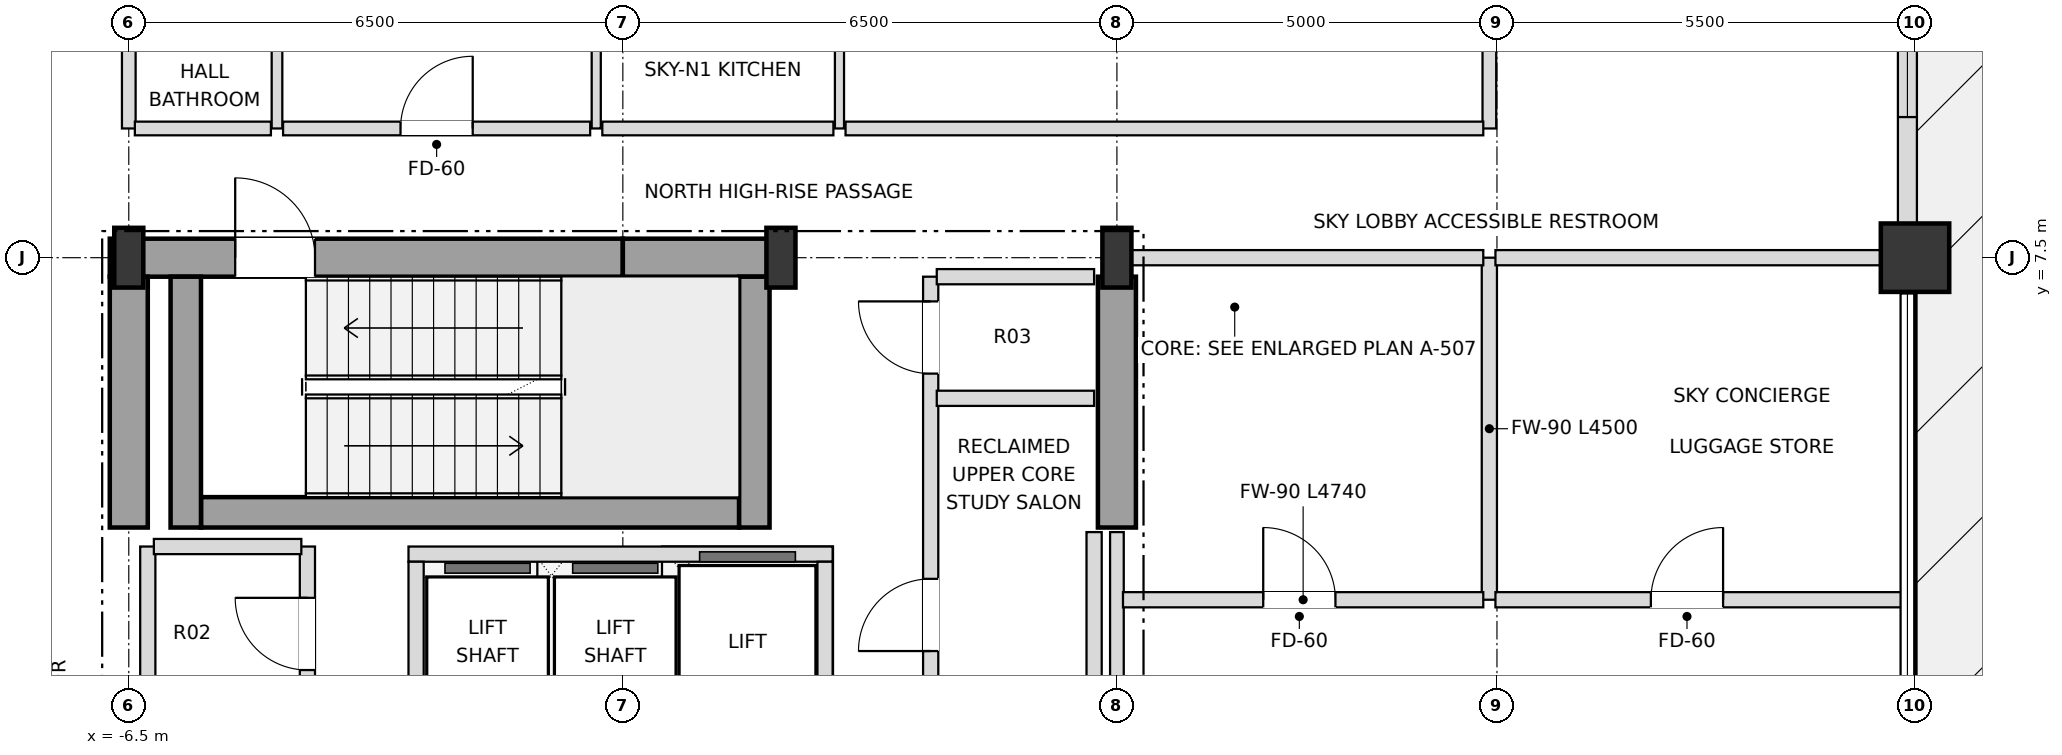
"""IFC4 building model, lengths in metres.
Left out: names, types, materials, properties, quantities, classifications, styles, units other than length and angle.
Written with IfcOpenShell. Run it as: python <this file> out.ifc"""

import sys

from ifc_helpers import new_model, si_unit, direction, frame, frame_2d, origin, origin_2d, place, context, subcontext, project, spatial, rectangle, i_section, extrude, element, fill, save


model = new_model("IFC4")
c1 = context("Model", 3, precision=1e-05, world=origin(), true_north=direction((0.0, 1.0)))
c2 = subcontext(c1, "Body", "Model", "MODEL_VIEW")
j1 = project(units=[si_unit("LENGTHUNIT", "METRE"), si_unit("PLANEANGLEUNIT", "RADIAN")], contexts=[c1])
p1 = place(None, origin())
s1 = spatial("IfcSite", under=j1, at=p1, CompositionType="ELEMENT")
p2 = place(p1, origin())
s2 = spatial("IfcBuilding", under=s1, at=p2, CompositionType="ELEMENT")
p3 = place(p2, frame((0.0, 0.0, 217.8)))
s3 = spatial("IfcBuildingStorey", under=s2, at=p3, CompositionType="ELEMENT", Elevation=217.8)
for number, where, z_axis, x_axis in (
    (1, (-6.5, 7.5, 0.0), (0.0, 0.0, 1.0), (1.0, 0.0, 0.0)),
    (2, (2.08, 7.5, 0.0), (0.0, 0.0, 1.0), (1.0, 0.0, 0.0)),
    (3, (6.5, 7.5, 0.0), (0.0, 0.0, 1.0), (1.0, 0.0, 0.0)),
):
    element("IfcColumn", number, at=place(p3, frame(where, z_axis=z_axis, x_axis=x_axis)), inside=s3, PredefinedType="COLUMN", context=c2, shape_type="SweptSolid", body=[
        extrude(i_section(OverallWidth=0.382, OverallDepth=0.786, WebThickness=0.02, FlangeThickness=0.033, at=origin_2d()), origin(), (0.0, 0.0, 1.0), 4.5),
    ])
p4 = place(p3, frame((17.0, 7.5, 0.0), z_axis=(0.0, 0.0, 1.0), x_axis=(1.0, 0.0, 0.0)))
e4 = element("IfcColumn", 4, at=p4, inside=s3, PredefinedType="USERDEFINED", context=c2, shape_type="SweptSolid", body=[
    extrude(rectangle(XDim=0.9, YDim=0.9, at=origin_2d()), origin(), (0.0, 0.0, 1.0), 4.5),
])
p5 = place(p3, frame((16.9, 7.945, 0.0), z_axis=(0.0, 0.0, 1.0), x_axis=(0.0, 1.0, 0.0)))
e5 = element("IfcWall", 5, at=p5, inside=s3, PredefinedType="SOLIDWALL", context=c2, shape_type="SweptSolid", body=[
    extrude(rectangle(XDim=4.61, YDim=0.25, at=frame_2d((2.305, 0.0))), origin(), (0.0, 0.0, 1.0), 3.648),
])
p6 = place(p5, frame((1.405, 0.0, 0.72)))
e6 = element("IfcOpeningElement", 6, at=p6, cuts=e5, PredefinedType="OPENING", context=c2, shape_type="SweptSolid", body=[
    extrude(rectangle(XDim=1.8, YDim=1.68, at=frame_2d((0.9, 0.84))), frame((0.0, 0.135, 0.0), z_axis=(0.0, -1.0, 0.0), x_axis=(1.0, 0.0, 0.0)), (0.0, 0.0, 1.0), 0.27),
])
p7 = place(p3, frame((-6.75, 7.5, 0.0), z_axis=(0.0, 0.0, 1.0), x_axis=(1.0, 0.0, 0.0)))
e7 = element("IfcWall", 7, at=p7, inside=s3, PredefinedType="SHEAR", context=c2, shape_type="SweptSolid", body=[
    extrude(rectangle(XDim=6.75, YDim=0.5, at=frame_2d((3.375, 0.0))), origin(), (0.0, 0.0, 1.0), 4.28),
])
p8 = place(p7, frame((1.65, 0.0, 0.0)))
e8 = element("IfcOpeningElement", 8, at=p8, cuts=e7, PredefinedType="OPENING", context=c2, shape_type="SweptSolid", body=[
    extrude(rectangle(XDim=1.05, YDim=2.15, at=frame_2d((0.525, 1.075))), frame((0.0, 0.26, 0.0), z_axis=(0.0, -1.0, 0.0), x_axis=(1.0, 0.0, 0.0)), (0.0, 0.0, 1.0), 0.52),
])
p9 = place(p3, frame((0.0, 7.5, 0.0), z_axis=(0.0, 0.0, 1.0), x_axis=(1.0, 0.0, 0.0)))
e9 = element("IfcWall", 9, at=p9, inside=s3, PredefinedType="SHEAR", context=c2, shape_type="SweptSolid", body=[
    extrude(rectangle(XDim=2.08, YDim=0.5, at=frame_2d((1.04, 0.0))), origin(), (0.0, 0.0, 1.0), 4.28),
])
for number, where, z_axis, x_axis in (
    (10, (-6.5, 3.95, 0.0), (0.0, 0.0, 1.0), (0.0, 1.0, 0.0)),
    (11, (6.5, 3.95, 0.0), (0.0, 0.0, 1.0), (0.0, 1.0, 0.0)),
):
    element("IfcWall", number, at=place(p3, frame(where, z_axis=z_axis, x_axis=x_axis)), inside=s3, PredefinedType="SHEAR", context=c2, shape_type="SweptSolid", body=[
        extrude(rectangle(XDim=3.3, YDim=0.5, at=frame_2d((1.65, 0.0))), origin(), (0.0, 0.0, 1.0), 4.28),
    ])
p10 = place(p3, frame((-5.55, 4.15, 0.0), z_axis=(0.0, 0.0, 1.0), x_axis=(1.0, 0.0, 0.0)))
e12 = element("IfcWall", 12, at=p10, inside=s3, PredefinedType="SHEAR", context=c2, shape_type="SweptSolid", body=[
    extrude(rectangle(XDim=7.08, YDim=0.4, at=frame_2d((3.54, 0.0))), origin(), (0.0, 0.0, 1.0), 4.28),
])
for number, where, z_axis, x_axis in (
    (13, (1.73, 3.95, 0.0), (0.0, 0.0, 1.0), (0.0, 1.0, 0.0)),
    (14, (-5.75, 3.95, 0.0), (0.0, 0.0, 1.0), (0.0, 1.0, 0.0)),
):
    element("IfcWall", number, at=place(p3, frame(where, z_axis=z_axis, x_axis=x_axis)), inside=s3, PredefinedType="SHEAR", context=c2, shape_type="SweptSolid", body=[
        extrude(rectangle(XDim=3.3, YDim=0.4, at=frame_2d((1.65, 0.0))), origin(), (0.0, 0.0, 1.0), 4.28),
    ])
p11 = place(p3, frame((-2.82, 3.6, 0.0), z_axis=(0.0, 0.0, 1.0), x_axis=(1.0, 0.0, 0.0)))
e15 = element("IfcWall", 15, at=p11, inside=s3, PredefinedType="SOLIDWALL", context=c2, shape_type="SweptSolid", body=[
    extrude(rectangle(XDim=5.58, YDim=0.2, at=frame_2d((2.79, 0.0))), origin(), (0.0, 0.0, 1.0), 4.28),
])
for number, where, z_axis, x_axis in (
    (16, (-2.72, 1.0, 0.0), (0.0, 0.0, 1.0), (0.0, 1.0, 0.0)),
    (17, (2.66, 1.0, 0.0), (0.0, 0.0, 1.0), (0.0, 1.0, 0.0)),
):
    element("IfcWall", number, at=place(p3, frame(where, z_axis=z_axis, x_axis=x_axis)), inside=s3, PredefinedType="SOLIDWALL", context=c2, shape_type="SweptSolid", body=[
        extrude(rectangle(XDim=2.5, YDim=0.2, at=frame_2d((1.25, 0.0))), origin(), (0.0, 0.0, 1.0), 4.28),
    ])
p12 = place(p3, frame((-6.5, 9.2, 0.0), z_axis=(0.0, 0.0, 1.0), x_axis=(0.0, 1.0, 0.0)))
e18 = element("IfcWall", 18, at=p12, inside=s3, PredefinedType="PARTITIONING", context=c2, shape_type="SweptSolid", body=[
    extrude(rectangle(XDim=10.7, YDim=0.18, at=frame_2d((5.35, 0.0))), origin(), (0.0, 0.0, 1.0), 3.726),
])
p13 = place(p3, frame((-6.25, -3.64, 0.0), z_axis=(0.0, 0.0, 1.0), x_axis=(0.0, 1.0, 0.0)))
e19 = element("IfcWall", 19, at=p13, inside=s3, PredefinedType="SOLIDWALL", context=c2, shape_type="SweptSolid", body=[
    extrude(rectangle(XDim=7.34, YDim=0.2, at=frame_2d((3.67, 0.0))), origin(), (0.0, 0.0, 1.0), 4.28),
])
p14 = place(p3, frame((-4.55, 9.2, 0.0), z_axis=(0.0, 0.0, 1.0), x_axis=(0.0, 1.0, 0.0)))
e20 = element("IfcWall", 20, at=p14, inside=s3, PredefinedType="PARTITIONING", context=c2, shape_type="SweptSolid", body=[
    extrude(rectangle(XDim=4.7, YDim=0.14, at=frame_2d((2.35, 0.0))), origin(), (0.0, 0.0, 1.0), 4.28),
])
p15 = place(p14, frame((1.9, 0.0, 0.0)))
e21 = element("IfcOpeningElement", 21, at=p15, cuts=e20, PredefinedType="OPENING", context=c2, shape_type="SweptSolid", body=[
    extrude(rectangle(XDim=0.9, YDim=2.1, at=frame_2d((0.45, 1.05))), frame((0.0, 0.08, 0.0), z_axis=(0.0, -1.0, 0.0), x_axis=(1.0, 0.0, 0.0)), (0.0, 0.0, 1.0), 0.16),
])
p16 = place(p3, frame((-4.15, -3.7, 0.0), z_axis=(0.0, 0.0, 1.0), x_axis=(0.0, 1.0, 0.0)))
e22 = element("IfcWall", 22, at=p16, inside=s3, PredefinedType="SOLIDWALL", context=c2, shape_type="SweptSolid", body=[
    extrude(rectangle(XDim=7.4, YDim=0.2, at=frame_2d((3.7, 0.0))), origin(), (0.0, 0.0, 1.0), 4.28),
])
p17 = place(p16, frame((2.025, 0.0, 0.0)))
e23 = element("IfcOpeningElement", 23, at=p17, cuts=e22, PredefinedType="OPENING", context=c2, shape_type="SweptSolid", body=[
    extrude(rectangle(XDim=0.95, YDim=2.15, at=frame_2d((0.475, 1.075))), frame((0.0, 0.11, 0.0), z_axis=(0.0, -1.0, 0.0), x_axis=(1.0, 0.0, 0.0)), (0.0, 0.0, 1.0), 0.22),
])
p18 = place(p16, frame((5.775, 0.0, 0.0)))
e24 = element("IfcOpeningElement", 24, at=p18, cuts=e22, PredefinedType="OPENING", context=c2, shape_type="SweptSolid", body=[
    extrude(rectangle(XDim=0.95, YDim=2.15, at=frame_2d((0.475, 1.075))), frame((0.0, 0.11, 0.0), z_axis=(0.0, -1.0, 0.0), x_axis=(1.0, 0.0, 0.0)), (0.0, 0.0, 1.0), 0.22),
])
p19 = place(p3, frame((-0.35, 9.2, 0.0), z_axis=(0.0, 0.0, 1.0), x_axis=(0.0, 1.0, 0.0)))
e25 = element("IfcWall", 25, at=p19, inside=s3, PredefinedType="PARTITIONING", context=c2, shape_type="SweptSolid", body=[
    extrude(rectangle(XDim=10.7, YDim=0.12, at=frame_2d((5.35, 0.0))), origin(), (0.0, 0.0, 1.0), 3.918),
])
p20 = place(p19, frame((1.875, 0.0, 0.0)))
e26 = element("IfcOpeningElement", 26, at=p20, cuts=e25, PredefinedType="OPENING", context=c2, shape_type="SweptSolid", body=[
    extrude(rectangle(XDim=0.95, YDim=2.1, at=frame_2d((0.475, 1.05))), frame((0.0, 0.07, 0.0), z_axis=(0.0, -1.0, 0.0), x_axis=(1.0, 0.0, 0.0)), (0.0, 0.0, 1.0), 0.14),
])
p21 = place(p19, frame((7.25, 0.0, 0.0)))
e27 = element("IfcOpeningElement", 27, at=p21, cuts=e25, PredefinedType="OPENING", context=c2, shape_type="SweptSolid", body=[
    extrude(rectangle(XDim=0.9, YDim=2.1, at=frame_2d((0.45, 1.05))), frame((0.0, 0.07, 0.0), z_axis=(0.0, -1.0, 0.0), x_axis=(1.0, 0.0, 0.0)), (0.0, 0.0, 1.0), 0.14),
])
p22 = place(p3, frame((2.85, 9.2, 0.0), z_axis=(0.0, 0.0, 1.0), x_axis=(0.0, 1.0, 0.0)))
e28 = element("IfcWall", 28, at=p22, inside=s3, PredefinedType="PARTITIONING", context=c2, shape_type="SweptSolid", body=[
    extrude(rectangle(XDim=4.7, YDim=0.12, at=frame_2d((2.35, 0.0))), origin(), (0.0, 0.0, 1.0), 4.28),
])
p23 = place(p22, frame((1.875, 0.0, 0.0)))
e29 = element("IfcOpeningElement", 29, at=p23, cuts=e28, PredefinedType="OPENING", context=c2, shape_type="SweptSolid", body=[
    extrude(rectangle(XDim=0.95, YDim=2.1, at=frame_2d((0.475, 1.05))), frame((0.0, 0.07, 0.0), z_axis=(0.0, -1.0, 0.0), x_axis=(1.0, 0.0, 0.0)), (0.0, 0.0, 1.0), 0.14),
])
p24 = place(p3, frame((4.05, 0.45, 0.0), z_axis=(0.0, 0.0, 1.0), x_axis=(0.0, 1.0, 0.0)))
e30 = element("IfcWall", 30, at=p24, inside=s3, PredefinedType="SOLIDWALL", context=c2, shape_type="SweptSolid", body=[
    extrude(rectangle(XDim=6.8, YDim=0.2, at=frame_2d((3.4, 0.0))), origin(), (0.0, 0.0, 1.0), 4.28),
])
p25 = place(p24, frame((1.875, 0.0, 0.0)))
e31 = element("IfcOpeningElement", 31, at=p25, cuts=e30, PredefinedType="OPENING", context=c2, shape_type="SweptSolid", body=[
    extrude(rectangle(XDim=0.95, YDim=2.15, at=frame_2d((0.475, 1.075))), frame((0.0, 0.11, 0.0), z_axis=(0.0, -1.0, 0.0), x_axis=(1.0, 0.0, 0.0)), (0.0, 0.0, 1.0), 0.22),
])
p26 = place(p24, frame((5.525, 0.0, 0.0)))
e32 = element("IfcOpeningElement", 32, at=p26, cuts=e30, PredefinedType="OPENING", context=c2, shape_type="SweptSolid", body=[
    extrude(rectangle(XDim=0.95, YDim=2.15, at=frame_2d((0.475, 1.075))), frame((0.0, 0.11, 0.0), z_axis=(0.0, -1.0, 0.0), x_axis=(1.0, 0.0, 0.0)), (0.0, 0.0, 1.0), 0.22),
])
p27 = place(p3, frame((6.2, 0.45, 0.0), z_axis=(0.0, 0.0, 1.0), x_axis=(0.0, 1.0, 0.0)))
e33 = element("IfcWall", 33, at=p27, inside=s3, PredefinedType="SOLIDWALL", context=c2, shape_type="SweptSolid", body=[
    extrude(rectangle(XDim=3.44, YDim=0.2, at=frame_2d((1.72, 0.0))), origin(), (0.0, 0.0, 1.0), 4.28),
])
p28 = place(p3, frame((6.5, -1.44, 0.0), z_axis=(0.0, 0.0, 1.0), x_axis=(0.0, 1.0, 0.0)))
e34 = element("IfcWall", 34, at=p28, inside=s3, PredefinedType="PARTITIONING", context=c2, shape_type="SweptSolid", body=[
    extrude(rectangle(XDim=5.33, YDim=0.18, at=frame_2d((2.665, 0.0))), origin(), (0.0, 0.0, 1.0), 3.726),
])
p29 = place(p3, frame((11.4, 3.0, 0.0), z_axis=(0.0, 0.0, 1.0), x_axis=(0.0, 1.0, 0.0)))
e35 = element("IfcWall", 35, at=p29, inside=s3, PredefinedType="SOLIDWALL", context=c2, shape_type="SweptSolid", body=[
    extrude(rectangle(XDim=4.5, YDim=0.2, at=frame_2d((2.25, 0.0))), origin(), (0.0, 0.0, 1.0), 3.918),
])
p30 = place(p3, frame((11.4, 9.2, 0.0), z_axis=(0.0, 0.0, 1.0), x_axis=(0.0, 1.0, 0.0)))
e36 = element("IfcWall", 36, at=p30, inside=s3, PredefinedType="PARTITIONING", context=c2, shape_type="SweptSolid", body=[
    extrude(rectangle(XDim=5.07, YDim=0.18, at=frame_2d((2.535, 0.0))), origin(), (0.0, 0.0, 1.0), 3.648),
])
p31 = place(p3, frame((6.58, 3.0, 0.0), z_axis=(0.0, 0.0, 1.0), x_axis=(1.0, 0.0, 0.0)))
e37 = element("IfcWall", 37, at=p31, inside=s3, PredefinedType="SOLIDWALL", context=c2, shape_type="SweptSolid", body=[
    extrude(rectangle(XDim=4.74, YDim=0.2, at=frame_2d((2.37, 0.0))), origin(), (0.0, 0.0, 1.0), 4.28),
])
p32 = place(p31, frame((1.845, 0.0, 0.0)))
e38 = element("IfcOpeningElement", 38, at=p32, cuts=e37, PredefinedType="OPENING", context=c2, shape_type="SweptSolid", body=[
    extrude(rectangle(XDim=0.95, YDim=2.15, at=frame_2d((0.475, 1.075))), frame((0.0, 0.11, 0.0), z_axis=(0.0, -1.0, 0.0), x_axis=(1.0, 0.0, 0.0)), (0.0, 0.0, 1.0), 0.22),
])
p33 = place(p3, frame((11.48, 3.0, 0.0), z_axis=(0.0, 0.0, 1.0), x_axis=(1.0, 0.0, 0.0)))
e39 = element("IfcWall", 39, at=p33, inside=s3, PredefinedType="SOLIDWALL", context=c2, shape_type="SweptSolid", body=[
    extrude(rectangle(XDim=5.34, YDim=0.2, at=frame_2d((2.67, 0.0))), origin(), (0.0, 0.0, 1.0), 4.28),
])
p34 = place(p33, frame((2.045, 0.0, 0.0)))
e40 = element("IfcOpeningElement", 40, at=p34, cuts=e39, PredefinedType="OPENING", context=c2, shape_type="SweptSolid", body=[
    extrude(rectangle(XDim=0.95, YDim=2.15, at=frame_2d((0.475, 1.075))), frame((0.0, 0.11, 0.0), z_axis=(0.0, -1.0, 0.0), x_axis=(1.0, 0.0, 0.0)), (0.0, 0.0, 1.0), 0.22),
])
p35 = place(p3, frame((-6.17, 3.7, 0.0), z_axis=(0.0, 0.0, 1.0), x_axis=(1.0, 0.0, 0.0)))
e41 = element("IfcWall", 41, at=p35, inside=s3, PredefinedType="SOLIDWALL", context=c2, shape_type="SweptSolid", body=[
    extrude(rectangle(XDim=1.94, YDim=0.2, at=frame_2d((0.97, 0.0))), origin(), (0.0, 0.0, 1.0), 4.28),
])
for number, where, z_axis, x_axis in (
    (42, (4.13, 5.65, 0.0), (0.0, 0.0, 1.0), (1.0, 0.0, 0.0)),
    (43, (4.13, 7.25, 0.0), (0.0, 0.0, 1.0), (1.0, 0.0, 0.0)),
):
    element("IfcWall", number, at=place(p3, frame(where, z_axis=z_axis, x_axis=x_axis)), inside=s3, PredefinedType="SOLIDWALL", context=c2, shape_type="SweptSolid", body=[
        extrude(rectangle(XDim=2.07, YDim=0.2, at=frame_2d((1.035, 0.0))), origin(), (0.0, 0.0, 1.0), 4.28),
    ])
p36 = place(p3, frame((6.5, 7.5, 0.0), z_axis=(0.0, 0.0, 1.0), x_axis=(1.0, 0.0, 0.0)))
e44 = element("IfcWall", 44, at=p36, inside=s3, PredefinedType="SOLIDWALL", context=c2, shape_type="SweptSolid", body=[
    extrude(rectangle(XDim=4.82, YDim=0.2, at=frame_2d((2.41, 0.0))), origin(), (0.0, 0.0, 1.0), 3.726),
])
p37 = place(p3, frame((11.48, 7.5, 0.0), z_axis=(0.0, 0.0, 1.0), x_axis=(1.0, 0.0, 0.0)))
e45 = element("IfcWall", 45, at=p37, inside=s3, PredefinedType="SOLIDWALL", context=c2, shape_type="SweptSolid", body=[
    extrude(rectangle(XDim=5.42, YDim=0.2, at=frame_2d((2.71, 0.0))), origin(), (0.0, 0.0, 1.0), 3.726),
])
p38 = place(p3, frame((-6.42, 9.2, 0.0), z_axis=(0.0, 0.0, 1.0), x_axis=(1.0, 0.0, 0.0)))
e46 = element("IfcWall", 46, at=p38, inside=s3, PredefinedType="PARTITIONING", context=c2, shape_type="SweptSolid", body=[
    extrude(rectangle(XDim=1.79, YDim=0.18, at=frame_2d((0.895, 0.0))), origin(), (0.0, 0.0, 1.0), 4.28),
])
p39 = place(p3, frame((-4.47, 9.2, 0.0), z_axis=(0.0, 0.0, 1.0), x_axis=(1.0, 0.0, 0.0)))
e47 = element("IfcWall", 47, at=p39, inside=s3, PredefinedType="PARTITIONING", context=c2, shape_type="SweptSolid", body=[
    extrude(rectangle(XDim=4.04, YDim=0.18, at=frame_2d((2.02, 0.0))), origin(), (0.0, 0.0, 1.0), 4.28),
])
p40 = place(p39, frame((1.545, 0.0, 0.0)))
e48 = element("IfcOpeningElement", 48, at=p40, cuts=e47, PredefinedType="OPENING", context=c2, shape_type="SweptSolid", body=[
    extrude(rectangle(XDim=0.95, YDim=2.15, at=frame_2d((0.475, 1.075))), frame((0.0, 0.1, 0.0), z_axis=(0.0, -1.0, 0.0), x_axis=(1.0, 0.0, 0.0)), (0.0, 0.0, 1.0), 0.2),
])
p41 = place(p3, frame((-0.27, 9.2, 0.0), z_axis=(0.0, 0.0, 1.0), x_axis=(1.0, 0.0, 0.0)))
e49 = element("IfcWall", 49, at=p41, inside=s3, PredefinedType="PARTITIONING", context=c2, shape_type="SweptSolid", body=[
    extrude(rectangle(XDim=3.04, YDim=0.18, at=frame_2d((1.52, 0.0))), origin(), (0.0, 0.0, 1.0), 4.28),
])
p42 = place(p3, frame((2.93, 9.2, 0.0), z_axis=(0.0, 0.0, 1.0), x_axis=(1.0, 0.0, 0.0)))
e50 = element("IfcWall", 50, at=p42, inside=s3, PredefinedType="PARTITIONING", context=c2, shape_type="SweptSolid", body=[
    extrude(rectangle(XDim=8.39, YDim=0.18, at=frame_2d((4.195, 0.0))), origin(), (0.0, 0.0, 1.0), 3.726),
])
p43 = place(p6, origin())
e51 = element("IfcWindow", 51, at=p43, inside=s3, PartitioningType="SINGLE_PANEL", PredefinedType="WINDOW", context=c2, shape_type="SweptSolid", body=[
    extrude(rectangle(XDim=1.8, YDim=1.68, at=frame_2d((0.9, 0.84))), frame((0.0, 0.03, 0.0), z_axis=(0.0, -1.0, 0.0), x_axis=(1.0, 0.0, 0.0)), (0.0, 0.0, 1.0), 0.06),
])
fill(e6, e51)
p44 = place(p8, origin())
e52 = element("IfcDoor", 52, at=p44, inside=s3, OperationType="SINGLE_SWING_LEFT", PredefinedType="DOOR", context=c2, shape_type="SweptSolid", body=[
    extrude(rectangle(XDim=1.05, YDim=2.15, at=frame_2d((0.525, 1.075))), frame((0.0, 0.025, 0.0), z_axis=(0.0, -1.0, 0.0), x_axis=(1.0, 0.0, 0.0)), (0.0, 0.0, 1.0), 0.05),
])
fill(e8, e52)
p45 = place(p18, origin())
e53 = element("IfcDoor", 53, at=p45, inside=s3, OperationType="SINGLE_SWING_RIGHT", PredefinedType="DOOR", context=c2, shape_type="SweptSolid", body=[
    extrude(rectangle(XDim=0.95, YDim=2.15, at=frame_2d((0.475, 1.075))), frame((0.0, 0.025, 0.0), z_axis=(0.0, -1.0, 0.0), x_axis=(1.0, 0.0, 0.0)), (0.0, 0.0, 1.0), 0.05),
])
fill(e24, e53)
p46 = place(p25, origin())
e54 = element("IfcDoor", 54, at=p46, inside=s3, OperationType="SINGLE_SWING_LEFT", PredefinedType="DOOR", context=c2, shape_type="SweptSolid", body=[
    extrude(rectangle(XDim=0.95, YDim=2.15, at=frame_2d((0.475, 1.075))), frame((0.0, 0.025, 0.0), z_axis=(0.0, -1.0, 0.0), x_axis=(1.0, 0.0, 0.0)), (0.0, 0.0, 1.0), 0.05),
])
fill(e31, e54)
p47 = place(p26, origin())
e55 = element("IfcDoor", 55, at=p47, inside=s3, OperationType="SINGLE_SWING_RIGHT", PredefinedType="DOOR", context=c2, shape_type="SweptSolid", body=[
    extrude(rectangle(XDim=0.95, YDim=2.15, at=frame_2d((0.475, 1.075))), frame((0.0, 0.025, 0.0), z_axis=(0.0, -1.0, 0.0), x_axis=(1.0, 0.0, 0.0)), (0.0, 0.0, 1.0), 0.05),
])
fill(e32, e55)
p48 = place(p32, origin())
e56 = element("IfcDoor", 56, at=p48, inside=s3, OperationType="SINGLE_SWING_LEFT", PredefinedType="DOOR", context=c2, shape_type="SweptSolid", body=[
    extrude(rectangle(XDim=0.95, YDim=2.15, at=frame_2d((0.475, 1.075))), frame((0.0, 0.025, 0.0), z_axis=(0.0, -1.0, 0.0), x_axis=(1.0, 0.0, 0.0)), (0.0, 0.0, 1.0), 0.05),
])
fill(e38, e56)
p49 = place(p34, origin())
e57 = element("IfcDoor", 57, at=p49, inside=s3, OperationType="SINGLE_SWING_RIGHT", PredefinedType="DOOR", context=c2, shape_type="SweptSolid", body=[
    extrude(rectangle(XDim=0.95, YDim=2.15, at=frame_2d((0.475, 1.075))), frame((0.0, 0.025, 0.0), z_axis=(0.0, -1.0, 0.0), x_axis=(1.0, 0.0, 0.0)), (0.0, 0.0, 1.0), 0.05),
])
fill(e40, e57)
p50 = place(p40, origin())
e58 = element("IfcDoor", 58, at=p50, inside=s3, OperationType="SINGLE_SWING_RIGHT", PredefinedType="DOOR", context=c2, shape_type="SweptSolid", body=[
    extrude(rectangle(XDim=0.95, YDim=2.15, at=frame_2d((0.475, 1.075))), frame((0.0, 0.025, 0.0), z_axis=(0.0, -1.0, 0.0), x_axis=(1.0, 0.0, 0.0)), (0.0, 0.0, 1.0), 0.05),
])
fill(e48, e58)
save(model, sys.argv[1])
